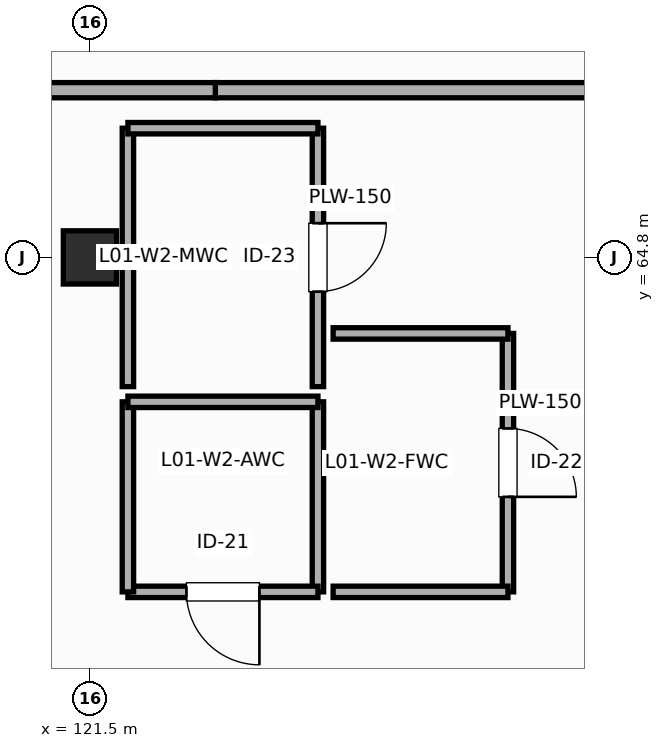
"""IFC4 building model, lengths in metres.
Left out: names, types, materials, properties, quantities, classifications, styles, units other than length and angle.
Written with IfcOpenShell. Run it as: python <this file> out.ifc"""

import sys

from ifc_helpers import new_model, si_unit, direction, frame, frame_2d, origin, origin_2d, place, context, subcontext, project, spatial, rectangle, extrude, element, fill, save


model = new_model("IFC4")
c1 = context("Model", 3, precision=1e-05, world=origin(), true_north=direction((0.0, 1.0)))
c2 = subcontext(c1, "Body", "Model", "MODEL_VIEW")
j1 = project(units=[si_unit("LENGTHUNIT", "METRE"), si_unit("PLANEANGLEUNIT", "RADIAN")], contexts=[c1])
p1 = place(None, origin())
s1 = spatial("IfcSite", under=j1, at=p1, CompositionType="ELEMENT")
p2 = place(p1, origin())
s2 = spatial("IfcBuilding", under=s1, at=p2, CompositionType="ELEMENT")
p3 = place(p2, frame((0.0, 0.0, 5.4)))
s3 = spatial("IfcBuildingStorey", under=s2, at=p3, CompositionType="ELEMENT", Elevation=5.4)
p4 = place(p3, frame((121.5, 64.8, 0.0), z_axis=(0.0, 0.0, 1.0), x_axis=(1.0, 0.0, 0.0)))
e1 = element("IfcColumn", 1, at=p4, inside=s3, PredefinedType="COLUMN", context=c2, shape_type="SweptSolid", body=[
    extrude(rectangle(XDim=0.7, YDim=0.7, at=origin_2d()), origin(), (0.0, 0.0, 1.0), 4.8),
])
p5 = place(p3, frame((124.5, 62.9, 0.0), z_axis=(0.0, 0.0, 1.0), x_axis=(0.0, -1.0, 0.0)))
e2 = element("IfcWall", 2, at=p5, inside=s3, PredefinedType="PLUMBINGWALL", context=c2, shape_type="SweptSolid", body=[
    extrude(rectangle(XDim=2.5, YDim=0.15, at=frame_2d((1.25, 0.0))), origin(), (0.0, 0.0, 1.0), 4.52),
])
p6 = place(p3, frame((124.5, 60.4, 0.0), z_axis=(0.0, 0.0, 1.0), x_axis=(-1.0, 0.0, 0.0)))
e3 = element("IfcWall", 3, at=p6, inside=s3, PredefinedType="PLUMBINGWALL", context=c2, shape_type="SweptSolid", body=[
    extrude(rectangle(XDim=2.5, YDim=0.15, at=frame_2d((1.25, 0.0))), origin(), (0.0, 0.0, 1.0), 4.52),
])
p7 = place(p6, frame((0.77, 0.0, 0.0)))
e4 = element("IfcOpeningElement", 4, at=p7, cuts=e3, PredefinedType="OPENING", context=c2, shape_type="SweptSolid", body=[
    extrude(rectangle(XDim=0.96, YDim=2.16, at=frame_2d((0.48, 1.08))), frame((0.0, 0.085, 0.0), z_axis=(0.0, -1.0, 0.0), x_axis=(1.0, 0.0, 0.0)), (0.0, 0.0, 1.0), 0.17),
])
for number, where, z_axis, x_axis in (
    (5, (122.0, 60.4, 0.0), (0.0, 0.0, 1.0), (0.0, 1.0, 0.0)),
    (6, (122.0, 62.9, 0.0), (0.0, 0.0, 1.0), (1.0, 0.0, 0.0)),
):
    element("IfcWall", number, at=place(p3, frame(where, z_axis=z_axis, x_axis=x_axis)), inside=s3, PredefinedType="PLUMBINGWALL", context=c2, shape_type="SweptSolid", body=[
        extrude(rectangle(XDim=2.5, YDim=0.15, at=frame_2d((1.25, 0.0))), origin(), (0.0, 0.0, 1.0), 4.52),
    ])
p8 = place(p3, frame((127.0, 63.8, 0.0), z_axis=(0.0, 0.0, 1.0), x_axis=(0.0, -1.0, 0.0)))
e7 = element("IfcWall", 7, at=p8, inside=s3, PredefinedType="PLUMBINGWALL", context=c2, shape_type="SweptSolid", body=[
    extrude(rectangle(XDim=3.4, YDim=0.15, at=frame_2d((1.7, 0.0))), origin(), (0.0, 0.0, 1.0), 4.52),
])
p9 = place(p8, frame((1.25, 0.0, 0.0)))
e8 = element("IfcOpeningElement", 8, at=p9, cuts=e7, PredefinedType="OPENING", context=c2, shape_type="SweptSolid", body=[
    extrude(rectangle(XDim=0.9, YDim=2.1, at=frame_2d((0.45, 1.05))), frame((0.0, 0.085, 0.0), z_axis=(0.0, -1.0, 0.0), x_axis=(1.0, 0.0, 0.0)), (0.0, 0.0, 1.0), 0.17),
])
for number, where, z_axis, x_axis in (
    (9, (127.0, 60.4, 0.0), (0.0, 0.0, 1.0), (-1.0, 0.0, 0.0)),
    (10, (124.7, 63.8, 0.0), (0.0, 0.0, 1.0), (1.0, 0.0, 0.0)),
):
    element("IfcWall", number, at=place(p3, frame(where, z_axis=z_axis, x_axis=x_axis)), inside=s3, PredefinedType="PLUMBINGWALL", context=c2, shape_type="SweptSolid", body=[
        extrude(rectangle(XDim=2.3, YDim=0.15, at=frame_2d((1.15, 0.0))), origin(), (0.0, 0.0, 1.0), 4.52),
    ])
p10 = place(p3, frame((124.5, 66.5, 0.0), z_axis=(0.0, 0.0, 1.0), x_axis=(0.0, -1.0, 0.0)))
e11 = element("IfcWall", 11, at=p10, inside=s3, PredefinedType="PLUMBINGWALL", context=c2, shape_type="SweptSolid", body=[
    extrude(rectangle(XDim=3.4, YDim=0.15, at=frame_2d((1.7, 0.0))), origin(), (0.0, 0.0, 1.0), 4.52),
])
p11 = place(p10, frame((1.25, 0.0, 0.0)))
e12 = element("IfcOpeningElement", 12, at=p11, cuts=e11, PredefinedType="OPENING", context=c2, shape_type="SweptSolid", body=[
    extrude(rectangle(XDim=0.9, YDim=2.2, at=frame_2d((0.45, 1.1))), frame((0.0, 0.085, 0.0), z_axis=(0.0, -1.0, 0.0), x_axis=(1.0, 0.0, 0.0)), (0.0, 0.0, 1.0), 0.17),
])
p12 = place(p3, frame((122.0, 63.1, 0.0), z_axis=(0.0, 0.0, 1.0), x_axis=(0.0, 1.0, 0.0)))
e13 = element("IfcWall", 13, at=p12, inside=s3, PredefinedType="PLUMBINGWALL", context=c2, shape_type="SweptSolid", body=[
    extrude(rectangle(XDim=3.4, YDim=0.15, at=frame_2d((1.7, 0.0))), origin(), (0.0, 0.0, 1.0), 4.52),
])
p13 = place(p3, frame((122.0, 66.5, 0.0), z_axis=(0.0, 0.0, 1.0), x_axis=(1.0, 0.0, 0.0)))
e14 = element("IfcWall", 14, at=p13, inside=s3, PredefinedType="PLUMBINGWALL", context=c2, shape_type="SweptSolid", body=[
    extrude(rectangle(XDim=2.5, YDim=0.15, at=frame_2d((1.25, 0.0))), origin(), (0.0, 0.0, 1.0), 4.52),
])
p14 = place(p3, frame((129.8, 67.0, 0.0), z_axis=(0.0, 0.0, 1.0), x_axis=(-1.0, 0.0, 0.0)))
e15 = element("IfcWall", 15, at=p14, inside=s3, PredefinedType="PARTITIONING", context=c2, shape_type="SweptSolid", body=[
    extrude(rectangle(XDim=6.65, YDim=0.2, at=frame_2d((3.325, 0.0))), origin(), (0.0, 0.0, 1.0), 4.52),
])
p15 = place(p3, frame((123.15, 67.0, 0.0), z_axis=(0.0, 0.0, 1.0), x_axis=(-1.0, 0.0, 0.0)))
e16 = element("IfcWall", 16, at=p15, inside=s3, PredefinedType="PARTITIONING", context=c2, shape_type="SweptSolid", body=[
    extrude(rectangle(XDim=6.65, YDim=0.2, at=frame_2d((3.325, 0.0))), origin(), (0.0, 0.0, 1.0), 4.52),
])
p16 = place(p7, origin())
e17 = element("IfcDoor", 17, at=p16, inside=s3, OperationType="SINGLE_SWING_LEFT", PredefinedType="DOOR", context=c2, shape_type="SweptSolid", body=[
    extrude(rectangle(XDim=0.96, YDim=2.16, at=frame_2d((0.48, 1.08))), frame((0.0, 0.025, 0.0), z_axis=(0.0, -1.0, 0.0), x_axis=(1.0, 0.0, 0.0)), (0.0, 0.0, 1.0), 0.05),
])
fill(e4, e17)
p17 = place(p9, origin())
e18 = element("IfcDoor", 18, at=p17, inside=s3, OperationType="SINGLE_SWING_RIGHT", PredefinedType="DOOR", context=c2, shape_type="SweptSolid", body=[
    extrude(rectangle(XDim=0.9, YDim=2.1, at=frame_2d((0.45, 1.05))), frame((0.0, 0.025, 0.0), z_axis=(0.0, -1.0, 0.0), x_axis=(1.0, 0.0, 0.0)), (0.0, 0.0, 1.0), 0.05),
])
fill(e8, e18)
p18 = place(p11, origin())
e19 = element("IfcDoor", 19, at=p18, inside=s3, OperationType="SINGLE_SWING_LEFT", PredefinedType="DOOR", context=c2, shape_type="SweptSolid", body=[
    extrude(rectangle(XDim=0.9, YDim=2.2, at=frame_2d((0.45, 1.1))), frame((0.0, 0.025, 0.0), z_axis=(0.0, -1.0, 0.0), x_axis=(1.0, 0.0, 0.0)), (0.0, 0.0, 1.0), 0.05),
])
fill(e12, e19)
save(model, sys.argv[1])
